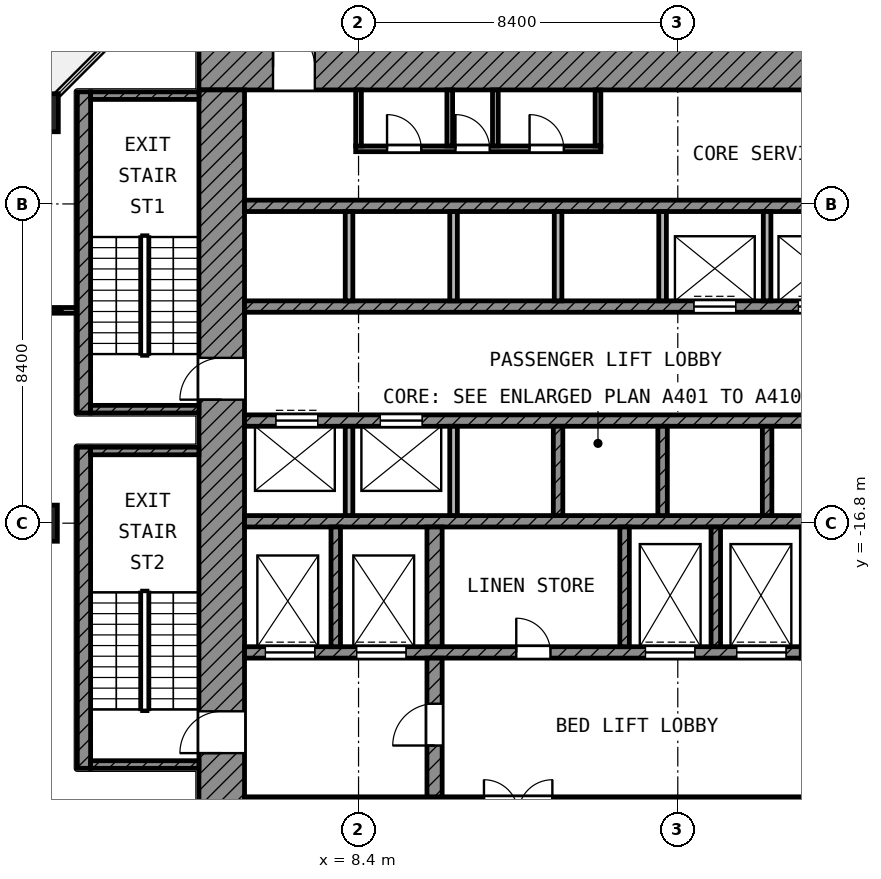
"""IFC4 building model, lengths in metres.
Left out: names, types, materials, properties, quantities, classifications, styles, units other than length and angle.
Written with IfcOpenShell. Run it as: python <this file> out.ifc"""

import sys

from ifc_helpers import new_model, si_unit, direction, frame, frame_2d, origin, origin_2d, place, context, subcontext, project, spatial, rectangle, extrude, element, fill, save


model = new_model("IFC4")
c1 = context("Model", 3, precision=1e-05, world=origin(), true_north=direction((0.0, 1.0)))
c2 = subcontext(c1, "Body", "Model", "MODEL_VIEW")
j1 = project(units=[si_unit("LENGTHUNIT", "METRE"), si_unit("PLANEANGLEUNIT", "RADIAN")], contexts=[c1])
p1 = place(None, origin())
s1 = spatial("IfcSite", under=j1, at=p1, CompositionType="ELEMENT")
p2 = place(p1, origin())
s2 = spatial("IfcBuilding", under=s1, at=p2, CompositionType="ELEMENT")
p3 = place(p2, frame((0.0, 0.0, 162.6)))
s3 = spatial("IfcBuildingStorey", under=s2, at=p3, CompositionType="ELEMENT", Elevation=162.6)
p4 = place(p3, frame((0.0, -6.0, 0.0), z_axis=(0.0, 0.0, 1.0), x_axis=(1.0, 0.0, 0.0)))
e1 = element("IfcColumn", 1, at=p4, inside=s3, PredefinedType="COLUMN", context=c2, shape_type="SweptSolid", body=[
    extrude(rectangle(XDim=1.0, YDim=1.0, at=origin_2d()), origin(), (0.0, 0.0, 1.0), 4.2),
])
p5 = place(p3, frame((0.0, -16.8, 0.0), z_axis=(0.0, 0.0, 1.0), x_axis=(1.0, 0.0, 0.0)))
e2 = element("IfcColumn", 2, at=p5, inside=s3, PredefinedType="COLUMN", context=c2, shape_type="SweptSolid", body=[
    extrude(rectangle(XDim=0.95, YDim=0.95, at=origin_2d()), origin(), (0.0, 0.0, 1.0), 4.2),
])
p6 = place(p3, frame((4.2, -4.8, 0.0), z_axis=(0.0, 0.0, 1.0), x_axis=(1.0, 0.0, 0.0)))
e3 = element("IfcWall", 3, at=p6, inside=s3, PredefinedType="SHEAR", context=c2, shape_type="SweptSolid", body=[
    extrude(rectangle(XDim=20.7, YDim=1.2, at=frame_2d((10.35, 0.0))), origin(), (0.0, 0.0, 1.0), 3.6),
])
p7 = place(p6, frame((1.95, 0.0, 0.0)))
e4 = element("IfcOpeningElement", 4, at=p7, cuts=e3, PredefinedType="OPENING", context=c2, shape_type="SweptSolid", body=[
    extrude(rectangle(XDim=1.1, YDim=2.1, at=frame_2d((0.55, 1.05))), frame((0.0, 0.61, 0.0), z_axis=(0.0, -1.0, 0.0), x_axis=(1.0, 0.0, 0.0)), (0.0, 0.0, 1.0), 1.22),
])
p8 = place(p6, frame((17.95, 0.0, 0.0)))
e5 = element("IfcOpeningElement", 5, at=p8, cuts=e3, PredefinedType="OPENING", context=c2, shape_type="SweptSolid", body=[
    extrude(rectangle(XDim=1.1, YDim=2.1, at=frame_2d((0.55, 1.05))), frame((0.0, 0.61, 0.0), z_axis=(0.0, -1.0, 0.0), x_axis=(1.0, 0.0, 0.0)), (0.0, 0.0, 1.0), 1.22),
])
p9 = place(p3, frame((4.8, -24.9, 0.0), z_axis=(0.0, 0.0, 1.0), x_axis=(0.0, 1.0, 0.0)))
e6 = element("IfcWall", 6, at=p9, inside=s3, PredefinedType="SHEAR", context=c2, shape_type="SweptSolid", body=[
    extrude(rectangle(XDim=19.5, YDim=1.2, at=frame_2d((9.75, 0.0))), origin(), (0.0, 0.0, 1.0), 3.6),
])
p10 = place(p9, frame((11.35, 0.0, 0.0)))
e7 = element("IfcOpeningElement", 7, at=p10, cuts=e6, PredefinedType="OPENING", context=c2, shape_type="SweptSolid", body=[
    extrude(rectangle(XDim=1.1, YDim=2.1, at=frame_2d((0.55, 1.05))), frame((0.0, 0.61, 0.0), z_axis=(0.0, -1.0, 0.0), x_axis=(1.0, 0.0, 0.0)), (0.0, 0.0, 1.0), 1.22),
])
p11 = place(p9, frame((2.05, 0.0, 0.0)))
e8 = element("IfcOpeningElement", 8, at=p11, cuts=e6, PredefinedType="OPENING", context=c2, shape_type="SweptSolid", body=[
    extrude(rectangle(XDim=1.1, YDim=2.1, at=frame_2d((0.55, 1.05))), frame((0.0, 0.61, 0.0), z_axis=(0.0, -1.0, 0.0), x_axis=(1.0, 0.0, 0.0)), (0.0, 0.0, 1.0), 1.22),
])
p12 = place(p3, frame((5.4, -24.45, 0.0), z_axis=(0.0, 0.0, 1.0), x_axis=(1.0, 0.0, 0.0)))
e9 = element("IfcWall", 9, at=p12, inside=s3, PredefinedType="SHEAR", context=c2, shape_type="SweptSolid", body=[
    extrude(rectangle(XDim=18.6, YDim=0.9, at=frame_2d((9.3, 0.0))), origin(), (0.0, 0.0, 1.0), 3.6),
])
p13 = place(p12, frame((6.3, 0.0, 0.0)))
e10 = element("IfcOpeningElement", 10, at=p13, cuts=e9, PredefinedType="OPENING", context=c2, shape_type="SweptSolid", body=[
    extrude(rectangle(XDim=1.8, YDim=2.1, at=frame_2d((0.9, 1.05))), frame((0.0, 0.46, 0.0), z_axis=(0.0, -1.0, 0.0), x_axis=(1.0, 0.0, 0.0)), (0.0, 0.0, 1.0), 0.92),
])
p14 = place(p3, frame((5.4, -8.45, 0.0), z_axis=(0.0, 0.0, 1.0), x_axis=(1.0, 0.0, 0.0)))
e11 = element("IfcWall", 11, at=p14, inside=s3, PredefinedType="SHEAR", context=c2, shape_type="SweptSolid", body=[
    extrude(rectangle(XDim=16.65, YDim=0.3, at=frame_2d((8.325, 0.0))), origin(), (0.0, 0.0, 1.0), 3.6),
])
p15 = place(p3, frame((5.4, -11.1, 0.0), z_axis=(0.0, 0.0, 1.0), x_axis=(1.0, 0.0, 0.0)))
e12 = element("IfcWall", 12, at=p15, inside=s3, PredefinedType="SHEAR", context=c2, shape_type="SweptSolid", body=[
    extrude(rectangle(XDim=16.65, YDim=0.3, at=frame_2d((8.325, 0.0))), origin(), (0.0, 0.0, 1.0), 3.6),
])
p16 = place(p15, frame((11.825, 0.0, 0.0)))
e13 = element("IfcOpeningElement", 13, at=p16, cuts=e12, PredefinedType="OPENING", context=c2, shape_type="SweptSolid", body=[
    extrude(rectangle(XDim=1.1, YDim=2.1, at=frame_2d((0.55, 1.05))), frame((0.0, 0.16, 0.0), z_axis=(0.0, -1.0, 0.0), x_axis=(1.0, 0.0, 0.0)), (0.0, 0.0, 1.0), 0.32),
])
p17 = place(p15, frame((14.575, 0.0, 0.0)))
e14 = element("IfcOpeningElement", 14, at=p17, cuts=e12, PredefinedType="OPENING", context=c2, shape_type="SweptSolid", body=[
    extrude(rectangle(XDim=1.1, YDim=2.1, at=frame_2d((0.55, 1.05))), frame((0.0, 0.16, 0.0), z_axis=(0.0, -1.0, 0.0), x_axis=(1.0, 0.0, 0.0)), (0.0, 0.0, 1.0), 0.32),
])
p18 = place(p3, frame((5.4, -14.1, 0.0), z_axis=(0.0, 0.0, 1.0), x_axis=(1.0, 0.0, 0.0)))
e15 = element("IfcWall", 15, at=p18, inside=s3, PredefinedType="SHEAR", context=c2, shape_type="SweptSolid", body=[
    extrude(rectangle(XDim=16.65, YDim=0.3, at=frame_2d((8.325, 0.0))), origin(), (0.0, 0.0, 1.0), 3.6),
])
p19 = place(p18, frame((0.825, 0.0, 0.0)))
e16 = element("IfcOpeningElement", 16, at=p19, cuts=e15, PredefinedType="OPENING", context=c2, shape_type="SweptSolid", body=[
    extrude(rectangle(XDim=1.1, YDim=2.1, at=frame_2d((0.55, 1.05))), frame((0.0, 0.16, 0.0), z_axis=(0.0, -1.0, 0.0), x_axis=(1.0, 0.0, 0.0)), (0.0, 0.0, 1.0), 0.32),
])
p20 = place(p18, frame((3.575, 0.0, 0.0)))
e17 = element("IfcOpeningElement", 17, at=p20, cuts=e15, PredefinedType="OPENING", context=c2, shape_type="SweptSolid", body=[
    extrude(rectangle(XDim=1.1, YDim=2.1, at=frame_2d((0.55, 1.05))), frame((0.0, 0.16, 0.0), z_axis=(0.0, -1.0, 0.0), x_axis=(1.0, 0.0, 0.0)), (0.0, 0.0, 1.0), 0.32),
])
p21 = place(p3, frame((5.4, -16.75, 0.0), z_axis=(0.0, 0.0, 1.0), x_axis=(1.0, 0.0, 0.0)))
e18 = element("IfcWall", 18, at=p21, inside=s3, PredefinedType="SHEAR", context=c2, shape_type="SweptSolid", body=[
    extrude(rectangle(XDim=16.65, YDim=0.3, at=frame_2d((8.325, 0.0))), origin(), (0.0, 0.0, 1.0), 3.6),
])
p22 = place(p3, frame((5.4, -20.2, 0.0), z_axis=(0.0, 0.0, 1.0), x_axis=(1.0, 0.0, 0.0)))
e19 = element("IfcWall", 19, at=p22, inside=s3, PredefinedType="SHEAR", context=c2, shape_type="SweptSolid", body=[
    extrude(rectangle(XDim=14.65, YDim=0.3, at=frame_2d((7.325, 0.0))), origin(), (0.0, 0.0, 1.0), 3.6),
])
p23 = place(p22, frame((10.55, 0.0, 0.0)))
e20 = element("IfcOpeningElement", 20, at=p23, cuts=e19, PredefinedType="OPENING", context=c2, shape_type="SweptSolid", body=[
    extrude(rectangle(XDim=1.3, YDim=2.1, at=frame_2d((0.65, 1.05))), frame((0.0, 0.16, 0.0), z_axis=(0.0, -1.0, 0.0), x_axis=(1.0, 0.0, 0.0)), (0.0, 0.0, 1.0), 0.32),
])
p24 = place(p22, frame((12.95, 0.0, 0.0)))
e21 = element("IfcOpeningElement", 21, at=p24, cuts=e19, PredefinedType="OPENING", context=c2, shape_type="SweptSolid", body=[
    extrude(rectangle(XDim=1.3, YDim=2.1, at=frame_2d((0.65, 1.05))), frame((0.0, 0.16, 0.0), z_axis=(0.0, -1.0, 0.0), x_axis=(1.0, 0.0, 0.0)), (0.0, 0.0, 1.0), 0.32),
])
p25 = place(p22, frame((0.55, 0.0, 0.0)))
e22 = element("IfcOpeningElement", 22, at=p25, cuts=e19, PredefinedType="OPENING", context=c2, shape_type="SweptSolid", body=[
    extrude(rectangle(XDim=1.3, YDim=2.1, at=frame_2d((0.65, 1.05))), frame((0.0, 0.16, 0.0), z_axis=(0.0, -1.0, 0.0), x_axis=(1.0, 0.0, 0.0)), (0.0, 0.0, 1.0), 0.32),
])
p26 = place(p22, frame((2.95, 0.0, 0.0)))
e23 = element("IfcOpeningElement", 23, at=p26, cuts=e19, PredefinedType="OPENING", context=c2, shape_type="SweptSolid", body=[
    extrude(rectangle(XDim=1.3, YDim=2.1, at=frame_2d((0.65, 1.05))), frame((0.0, 0.16, 0.0), z_axis=(0.0, -1.0, 0.0), x_axis=(1.0, 0.0, 0.0)), (0.0, 0.0, 1.0), 0.32),
])
p27 = place(p22, frame((7.15, 0.0, 0.0)))
e24 = element("IfcOpeningElement", 24, at=p27, cuts=e19, PredefinedType="OPENING", context=c2, shape_type="SweptSolid", body=[
    extrude(rectangle(XDim=0.9, YDim=2.1, at=frame_2d((0.45, 1.05))), frame((0.0, 0.16, 0.0), z_axis=(0.0, -1.0, 0.0), x_axis=(1.0, 0.0, 0.0)), (0.0, 0.0, 1.0), 0.32),
])
p28 = place(p3, frame((10.4, -24.0, 0.0), z_axis=(0.0, 0.0, 1.0), x_axis=(0.0, 1.0, 0.0)))
e25 = element("IfcWall", 25, at=p28, inside=s3, PredefinedType="SHEAR", context=c2, shape_type="SweptSolid", body=[
    extrude(rectangle(XDim=3.65, YDim=0.4, at=frame_2d((1.825, 0.0))), origin(), (0.0, 0.0, 1.0), 3.6),
])
p29 = place(p28, frame((1.35, 0.0, 0.0)))
e26 = element("IfcOpeningElement", 26, at=p29, cuts=e25, PredefinedType="OPENING", context=c2, shape_type="SweptSolid", body=[
    extrude(rectangle(XDim=1.1, YDim=2.1, at=frame_2d((0.55, 1.05))), frame((0.0, 0.21, 0.0), z_axis=(0.0, -1.0, 0.0), x_axis=(1.0, 0.0, 0.0)), (0.0, 0.0, 1.0), 0.42),
])
p30 = place(p3, frame((10.4, -20.05, 0.0), z_axis=(0.0, 0.0, 1.0), x_axis=(0.0, 1.0, 0.0)))
e27 = element("IfcWall", 27, at=p30, inside=s3, PredefinedType="SHEAR", context=c2, shape_type="SweptSolid", body=[
    extrude(rectangle(XDim=3.15, YDim=0.4, at=frame_2d((1.575, 0.0))), origin(), (0.0, 0.0, 1.0), 3.6),
])
p31 = place(p3, frame((20.2, -20.35, 0.0), z_axis=(0.0, 0.0, 1.0), x_axis=(0.0, 1.0, 0.0)))
e28 = element("IfcWall", 28, at=p31, inside=s3, PredefinedType="SHEAR", context=c2, shape_type="SweptSolid", body=[
    extrude(rectangle(XDim=3.45, YDim=0.3, at=frame_2d((1.725, 0.0))), origin(), (0.0, 0.0, 1.0), 3.6),
])
for number, where, z_axis, x_axis in (
    (29, (7.8, -20.05, 0.0), (0.0, 0.0, 1.0), (0.0, 1.0, 0.0)),
    (30, (15.4, -20.05, 0.0), (0.0, 0.0, 1.0), (0.0, 1.0, 0.0)),
    (31, (17.8, -20.05, 0.0), (0.0, 0.0, 1.0), (0.0, 1.0, 0.0)),
):
    element("IfcWall", number, at=place(p3, frame(where, z_axis=z_axis, x_axis=x_axis)), inside=s3, PredefinedType="SHEAR", context=c2, shape_type="SweptSolid", body=[
        extrude(rectangle(XDim=3.15, YDim=0.25, at=frame_2d((1.575, 0.0))), origin(), (0.0, 0.0, 1.0), 3.6),
    ])
for number, where, z_axis, x_axis in (
    (32, (8.15, -10.95, 0.0), (0.0, 0.0, 1.0), (0.0, 1.0, 0.0)),
    (33, (10.9, -10.95, 0.0), (0.0, 0.0, 1.0), (0.0, 1.0, 0.0)),
    (34, (13.65, -10.95, 0.0), (0.0, 0.0, 1.0), (0.0, 1.0, 0.0)),
    (35, (16.4, -10.95, 0.0), (0.0, 0.0, 1.0), (0.0, 1.0, 0.0)),
    (36, (19.15, -10.95, 0.0), (0.0, 0.0, 1.0), (0.0, 1.0, 0.0)),
):
    element("IfcWall", number, at=place(p3, frame(where, z_axis=z_axis, x_axis=x_axis)), inside=s3, PredefinedType="PARTITIONING", context=c2, shape_type="SweptSolid", body=[
        extrude(rectangle(XDim=2.35, YDim=0.2, at=frame_2d((1.175, 0.0))), origin(), (0.0, 0.0, 1.0), 3.6),
    ])
for number, where, z_axis, x_axis in (
    (37, (8.15, -16.6, 0.0), (0.0, 0.0, 1.0), (0.0, 1.0, 0.0)),
    (38, (10.9, -16.6, 0.0), (0.0, 0.0, 1.0), (0.0, 1.0, 0.0)),
):
    element("IfcWall", number, at=place(p3, frame(where, z_axis=z_axis, x_axis=x_axis)), inside=s3, PredefinedType="PARTITIONING", context=c2, shape_type="SweptSolid", body=[
        extrude(rectangle(XDim=2.35, YDim=0.2, at=frame_2d((1.175, 0.0))), origin(), (0.0, 0.0, 1.0), 3.6),
    ])
for number, where, z_axis, x_axis in (
    (39, (13.65, -16.6, 0.0), (0.0, 0.0, 1.0), (0.0, 1.0, 0.0)),
    (40, (16.4, -16.6, 0.0), (0.0, 0.0, 1.0), (0.0, 1.0, 0.0)),
    (41, (19.15, -16.6, 0.0), (0.0, 0.0, 1.0), (0.0, 1.0, 0.0)),
):
    element("IfcWall", number, at=place(p3, frame(where, z_axis=z_axis, x_axis=x_axis)), inside=s3, PredefinedType="SHEAR", context=c2, shape_type="SweptSolid", body=[
        extrude(rectangle(XDim=2.35, YDim=0.25, at=frame_2d((1.175, 0.0))), origin(), (0.0, 0.0, 1.0), 3.6),
    ])
p32 = place(p3, frame((8.325, -6.95, 0.0), z_axis=(0.0, 0.0, 1.0), x_axis=(1.0, 0.0, 0.0)))
e42 = element("IfcWall", 42, at=p32, inside=s3, PredefinedType="PARTITIONING", context=c2, shape_type="SweptSolid", body=[
    extrude(rectangle(XDim=6.45, YDim=0.15, at=frame_2d((3.225, 0.0))), origin(), (0.0, 0.0, 1.0), 3.6),
])
p33 = place(p32, frame((0.825, 0.0, 0.0)))
e43 = element("IfcOpeningElement", 43, at=p33, cuts=e42, PredefinedType="OPENING", context=c2, shape_type="SweptSolid", body=[
    extrude(rectangle(XDim=0.9, YDim=2.1, at=frame_2d((0.45, 1.05))), frame((0.0, 0.085, 0.0), z_axis=(0.0, -1.0, 0.0), x_axis=(1.0, 0.0, 0.0)), (0.0, 0.0, 1.0), 0.17),
])
p34 = place(p32, frame((2.625, 0.0, 0.0)))
e44 = element("IfcOpeningElement", 44, at=p34, cuts=e42, PredefinedType="OPENING", context=c2, shape_type="SweptSolid", body=[
    extrude(rectangle(XDim=0.9, YDim=2.1, at=frame_2d((0.45, 1.05))), frame((0.0, 0.085, 0.0), z_axis=(0.0, -1.0, 0.0), x_axis=(1.0, 0.0, 0.0)), (0.0, 0.0, 1.0), 0.17),
])
p35 = place(p32, frame((4.575, 0.0, 0.0)))
e45 = element("IfcOpeningElement", 45, at=p35, cuts=e42, PredefinedType="OPENING", context=c2, shape_type="SweptSolid", body=[
    extrude(rectangle(XDim=0.9, YDim=2.1, at=frame_2d((0.45, 1.05))), frame((0.0, 0.085, 0.0), z_axis=(0.0, -1.0, 0.0), x_axis=(1.0, 0.0, 0.0)), (0.0, 0.0, 1.0), 0.17),
])
for number, where, z_axis, x_axis in (
    (46, (8.4, -6.875, 0.0), (0.0, 0.0, 1.0), (0.0, 1.0, 0.0)),
    (47, (10.8, -6.875, 0.0), (0.0, 0.0, 1.0), (0.0, 1.0, 0.0)),
    (48, (12.0, -6.875, 0.0), (0.0, 0.0, 1.0), (0.0, 1.0, 0.0)),
    (49, (14.7, -6.875, 0.0), (0.0, 0.0, 1.0), (0.0, 1.0, 0.0)),
):
    element("IfcWall", number, at=place(p3, frame(where, z_axis=z_axis, x_axis=x_axis)), inside=s3, PredefinedType="PARTITIONING", context=c2, shape_type="SweptSolid", body=[
        extrude(rectangle(XDim=1.475, YDim=0.15, at=frame_2d((0.738, 0.0))), origin(), (0.0, 0.0, 1.0), 3.6),
    ])
p36 = place(p3, frame((1.175, -13.9, 0.0), z_axis=(0.0, 0.0, 1.0), x_axis=(0.0, 1.0, 0.0)))
e50 = element("IfcWall", 50, at=p36, inside=s3, PredefinedType="SHEAR", context=c2, shape_type="SweptSolid", body=[
    extrude(rectangle(XDim=8.45, YDim=0.35, at=frame_2d((4.225, 0.0))), origin(), (0.0, 0.0, 1.0), 3.6),
])
for number, where, z_axis, x_axis in (
    (51, (1.35, -5.55, 0.0), (0.0, 0.0, 1.0), (1.0, 0.0, 0.0)),
    (52, (1.35, -13.8, 0.0), (0.0, 0.0, 1.0), (1.0, 0.0, 0.0)),
):
    element("IfcWall", number, at=place(p3, frame(where, z_axis=z_axis, x_axis=x_axis)), inside=s3, PredefinedType="SHEAR", context=c2, shape_type="SweptSolid", body=[
        extrude(rectangle(XDim=2.85, YDim=0.2, at=frame_2d((1.425, 0.0))), origin(), (0.0, 0.0, 1.0), 3.6),
    ])
p37 = place(p3, frame((1.175, -23.25, 0.0), z_axis=(0.0, 0.0, 1.0), x_axis=(0.0, 1.0, 0.0)))
e53 = element("IfcWall", 53, at=p37, inside=s3, PredefinedType="SHEAR", context=c2, shape_type="SweptSolid", body=[
    extrude(rectangle(XDim=8.45, YDim=0.35, at=frame_2d((4.225, 0.0))), origin(), (0.0, 0.0, 1.0), 3.6),
])
for number, where, z_axis, x_axis in (
    (54, (1.35, -14.9, 0.0), (0.0, 0.0, 1.0), (1.0, 0.0, 0.0)),
    (55, (1.35, -23.15, 0.0), (0.0, 0.0, 1.0), (1.0, 0.0, 0.0)),
):
    element("IfcWall", number, at=place(p3, frame(where, z_axis=z_axis, x_axis=x_axis)), inside=s3, PredefinedType="SHEAR", context=c2, shape_type="SweptSolid", body=[
        extrude(rectangle(XDim=2.85, YDim=0.2, at=frame_2d((1.425, 0.0))), origin(), (0.0, 0.0, 1.0), 3.6),
    ])
p38 = place(p3, frame((0.08, -11.2, 0.0), z_axis=(0.0, 0.0, 1.0), x_axis=(1.0, 0.0, 0.0)))
e56 = element("IfcWall", 56, at=p38, inside=s3, PredefinedType="PARTITIONING", context=c2, shape_type="SweptSolid", body=[
    extrude(rectangle(XDim=0.89, YDim=0.15, at=frame_2d((0.445, 0.0))), origin(), (0.0, 0.0, 1.0), 3.6),
])
p39 = place(p16, origin())
e57 = element("IfcDoor", 57, at=p39, inside=s3, OperationType="DOUBLE_DOOR_SLIDING", PredefinedType="DOOR", context=c2, shape_type="SweptSolid", body=[
    extrude(rectangle(XDim=1.1, YDim=2.1, at=frame_2d((0.55, 1.05))), frame((0.0, 0.025, 0.0), z_axis=(0.0, -1.0, 0.0), x_axis=(1.0, 0.0, 0.0)), (0.0, 0.0, 1.0), 0.05),
])
fill(e13, e57)
p40 = place(p17, origin())
e58 = element("IfcDoor", 58, at=p40, inside=s3, OperationType="DOUBLE_DOOR_SLIDING", PredefinedType="DOOR", context=c2, shape_type="SweptSolid", body=[
    extrude(rectangle(XDim=1.1, YDim=2.1, at=frame_2d((0.55, 1.05))), frame((0.0, 0.025, 0.0), z_axis=(0.0, -1.0, 0.0), x_axis=(1.0, 0.0, 0.0)), (0.0, 0.0, 1.0), 0.05),
])
fill(e14, e58)
p41 = place(p19, origin())
e59 = element("IfcDoor", 59, at=p41, inside=s3, OperationType="DOUBLE_DOOR_SLIDING", PredefinedType="DOOR", context=c2, shape_type="SweptSolid", body=[
    extrude(rectangle(XDim=1.1, YDim=2.1, at=frame_2d((0.55, 1.05))), frame((0.0, 0.025, 0.0), z_axis=(0.0, -1.0, 0.0), x_axis=(1.0, 0.0, 0.0)), (0.0, 0.0, 1.0), 0.05),
])
fill(e16, e59)
p42 = place(p20, origin())
e60 = element("IfcDoor", 60, at=p42, inside=s3, OperationType="DOUBLE_DOOR_SLIDING", PredefinedType="DOOR", context=c2, shape_type="SweptSolid", body=[
    extrude(rectangle(XDim=1.1, YDim=2.1, at=frame_2d((0.55, 1.05))), frame((0.0, 0.025, 0.0), z_axis=(0.0, -1.0, 0.0), x_axis=(1.0, 0.0, 0.0)), (0.0, 0.0, 1.0), 0.05),
])
fill(e17, e60)
p43 = place(p23, origin())
e61 = element("IfcDoor", 61, at=p43, inside=s3, OperationType="DOUBLE_DOOR_SLIDING", PredefinedType="DOOR", context=c2, shape_type="SweptSolid", body=[
    extrude(rectangle(XDim=1.3, YDim=2.1, at=frame_2d((0.65, 1.05))), frame((0.0, 0.025, 0.0), z_axis=(0.0, -1.0, 0.0), x_axis=(1.0, 0.0, 0.0)), (0.0, 0.0, 1.0), 0.05),
])
fill(e20, e61)
p44 = place(p24, origin())
e62 = element("IfcDoor", 62, at=p44, inside=s3, OperationType="DOUBLE_DOOR_SLIDING", PredefinedType="DOOR", context=c2, shape_type="SweptSolid", body=[
    extrude(rectangle(XDim=1.3, YDim=2.1, at=frame_2d((0.65, 1.05))), frame((0.0, 0.025, 0.0), z_axis=(0.0, -1.0, 0.0), x_axis=(1.0, 0.0, 0.0)), (0.0, 0.0, 1.0), 0.05),
])
fill(e21, e62)
p45 = place(p25, origin())
e63 = element("IfcDoor", 63, at=p45, inside=s3, OperationType="DOUBLE_DOOR_SLIDING", PredefinedType="DOOR", context=c2, shape_type="SweptSolid", body=[
    extrude(rectangle(XDim=1.3, YDim=2.1, at=frame_2d((0.65, 1.05))), frame((0.0, 0.025, 0.0), z_axis=(0.0, -1.0, 0.0), x_axis=(1.0, 0.0, 0.0)), (0.0, 0.0, 1.0), 0.05),
])
fill(e22, e63)
p46 = place(p26, origin())
e64 = element("IfcDoor", 64, at=p46, inside=s3, OperationType="DOUBLE_DOOR_SLIDING", PredefinedType="DOOR", context=c2, shape_type="SweptSolid", body=[
    extrude(rectangle(XDim=1.3, YDim=2.1, at=frame_2d((0.65, 1.05))), frame((0.0, 0.025, 0.0), z_axis=(0.0, -1.0, 0.0), x_axis=(1.0, 0.0, 0.0)), (0.0, 0.0, 1.0), 0.05),
])
fill(e23, e64)
p47 = place(p10, origin())
e65 = element("IfcDoor", 65, at=p47, inside=s3, OperationType="SINGLE_SWING_LEFT", PredefinedType="DOOR", context=c2, shape_type="SweptSolid", body=[
    extrude(rectangle(XDim=1.1, YDim=2.1, at=frame_2d((0.55, 1.05))), frame((0.0, 0.025, 0.0), z_axis=(0.0, -1.0, 0.0), x_axis=(1.0, 0.0, 0.0)), (0.0, 0.0, 1.0), 0.05),
])
fill(e7, e65)
p48 = place(p11, origin())
e66 = element("IfcDoor", 66, at=p48, inside=s3, OperationType="SINGLE_SWING_LEFT", PredefinedType="DOOR", context=c2, shape_type="SweptSolid", body=[
    extrude(rectangle(XDim=1.1, YDim=2.1, at=frame_2d((0.55, 1.05))), frame((0.0, 0.025, 0.0), z_axis=(0.0, -1.0, 0.0), x_axis=(1.0, 0.0, 0.0)), (0.0, 0.0, 1.0), 0.05),
])
fill(e8, e66)
p49 = place(p7, origin())
e67 = element("IfcDoor", 67, at=p49, inside=s3, OperationType="SINGLE_SWING_LEFT", PredefinedType="DOOR", context=c2, shape_type="SweptSolid", body=[
    extrude(rectangle(XDim=1.1, YDim=2.1, at=frame_2d((0.55, 1.05))), frame((0.0, 0.025, 0.0), z_axis=(0.0, -1.0, 0.0), x_axis=(1.0, 0.0, 0.0)), (0.0, 0.0, 1.0), 0.05),
])
fill(e4, e67)
p50 = place(p29, origin())
e68 = element("IfcDoor", 68, at=p50, inside=s3, OperationType="SINGLE_SWING_LEFT", PredefinedType="DOOR", context=c2, shape_type="SweptSolid", body=[
    extrude(rectangle(XDim=1.1, YDim=2.1, at=frame_2d((0.55, 1.05))), frame((0.0, 0.025, 0.0), z_axis=(0.0, -1.0, 0.0), x_axis=(1.0, 0.0, 0.0)), (0.0, 0.0, 1.0), 0.05),
])
fill(e26, e68)
p51 = place(p33, origin())
e69 = element("IfcDoor", 69, at=p51, inside=s3, OperationType="SINGLE_SWING_LEFT", PredefinedType="DOOR", context=c2, shape_type="SweptSolid", body=[
    extrude(rectangle(XDim=0.9, YDim=2.1, at=frame_2d((0.45, 1.05))), frame((0.0, 0.025, 0.0), z_axis=(0.0, -1.0, 0.0), x_axis=(1.0, 0.0, 0.0)), (0.0, 0.0, 1.0), 0.05),
])
fill(e43, e69)
p52 = place(p34, origin())
e70 = element("IfcDoor", 70, at=p52, inside=s3, OperationType="SINGLE_SWING_LEFT", PredefinedType="DOOR", context=c2, shape_type="SweptSolid", body=[
    extrude(rectangle(XDim=0.9, YDim=2.1, at=frame_2d((0.45, 1.05))), frame((0.0, 0.025, 0.0), z_axis=(0.0, -1.0, 0.0), x_axis=(1.0, 0.0, 0.0)), (0.0, 0.0, 1.0), 0.05),
])
fill(e44, e70)
p53 = place(p35, origin())
e71 = element("IfcDoor", 71, at=p53, inside=s3, OperationType="SINGLE_SWING_LEFT", PredefinedType="DOOR", context=c2, shape_type="SweptSolid", body=[
    extrude(rectangle(XDim=0.9, YDim=2.1, at=frame_2d((0.45, 1.05))), frame((0.0, 0.025, 0.0), z_axis=(0.0, -1.0, 0.0), x_axis=(1.0, 0.0, 0.0)), (0.0, 0.0, 1.0), 0.05),
])
fill(e45, e71)
p54 = place(p27, origin())
e72 = element("IfcDoor", 72, at=p54, inside=s3, OperationType="SINGLE_SWING_LEFT", PredefinedType="DOOR", context=c2, shape_type="SweptSolid", body=[
    extrude(rectangle(XDim=0.9, YDim=2.1, at=frame_2d((0.45, 1.05))), frame((0.0, 0.025, 0.0), z_axis=(0.0, -1.0, 0.0), x_axis=(1.0, 0.0, 0.0)), (0.0, 0.0, 1.0), 0.05),
])
fill(e24, e72)
save(model, sys.argv[1])
